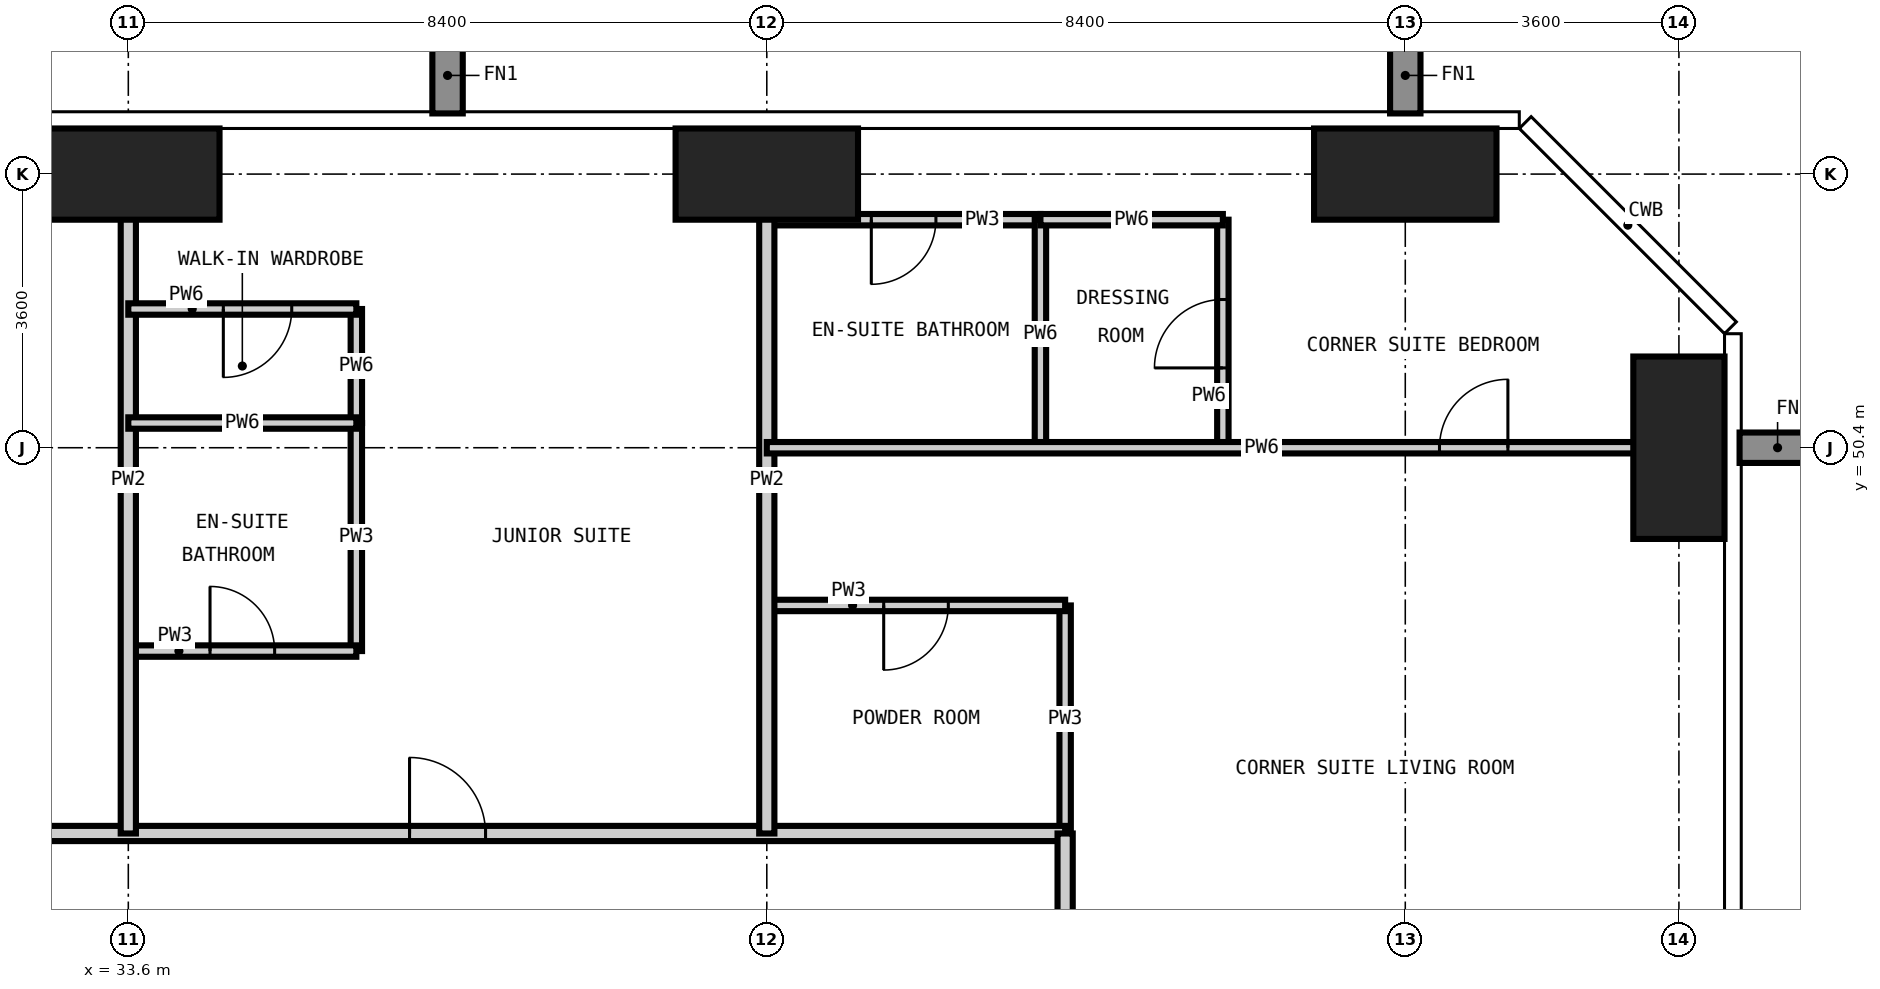
"""IFC4 building model, lengths in metres.
Left out: names, types, materials, properties, quantities, classifications, styles, units other than length and angle.
Written with IfcOpenShell. Run it as: python <this file> out.ifc"""

import sys

from ifc_helpers import new_model, si_unit, direction, frame, frame_2d, origin, origin_2d, place, context, subcontext, project, spatial, rectangle, extrude, element, fill, save


model = new_model("IFC4")
c1 = context("Model", 3, precision=1e-05, world=origin(), true_north=direction((0.0, 1.0)))
c2 = subcontext(c1, "Body", "Model", "MODEL_VIEW")
j1 = project(units=[si_unit("LENGTHUNIT", "METRE"), si_unit("PLANEANGLEUNIT", "RADIAN")], contexts=[c1])
p1 = place(None, origin())
s1 = spatial("IfcSite", under=j1, at=p1, CompositionType="ELEMENT")
p2 = place(p1, origin())
s2 = spatial("IfcBuilding", under=s1, at=p2, CompositionType="ELEMENT")
p3 = place(p2, frame((0.0, 0.0, 100.8)))
s3 = spatial("IfcBuildingStorey", under=s2, at=p3, CompositionType="ELEMENT", Elevation=100.8)
for number, where, z_axis, x_axis in (
    (1, (33.6, 54.0, -0.35), (0.0, 0.0, 1.0), (1.0, 0.0, 0.0)),
    (2, (42.0, 54.0, -0.35), (0.0, 0.0, 1.0), (1.0, 0.0, 0.0)),
    (3, (50.4, 54.0, -0.35), (0.0, 0.0, 1.0), (1.0, 0.0, 0.0)),
):
    element("IfcColumn", number, at=place(p3, frame(where, z_axis=z_axis, x_axis=x_axis)), inside=s3, PredefinedType="COLUMN", context=c2, shape_type="SweptSolid", body=[
        extrude(rectangle(XDim=2.4, YDim=1.2, at=origin_2d()), origin(), (0.0, 0.0, 1.0), 3.6),
    ])
p4 = place(p3, frame((54.0, 50.4, -0.35), z_axis=(0.0, 0.0, 1.0), x_axis=(1.0, 0.0, 0.0)))
e4 = element("IfcColumn", 4, at=p4, inside=s3, PredefinedType="COLUMN", context=c2, shape_type="SweptSolid", body=[
    extrude(rectangle(XDim=1.2, YDim=2.4, at=origin_2d()), origin(), (0.0, 0.0, 1.0), 3.6),
])
for number, where, z_axis, x_axis in (
    (5, (36.6, 47.725, 0.0), (0.0, 0.0, 1.0), (0.0, 1.0, 0.0)),
    (6, (45.925, 45.325, 0.0), (0.0, 0.0, 1.0), (0.0, 1.0, 0.0)),
):
    element("IfcWall", number, at=place(p3, frame(where, z_axis=z_axis, x_axis=x_axis)), inside=s3, PredefinedType="PARTITIONING", context=c2, shape_type="SweptSolid", body=[
        extrude(rectangle(XDim=3.0, YDim=0.15, at=frame_2d((1.5, 0.0))), origin(), (0.0, 0.0, 1.0), 3.25),
    ])
p5 = place(p3, frame((33.6, 47.725, 0.0), z_axis=(0.0, 0.0, 1.0), x_axis=(1.0, 0.0, 0.0)))
e7 = element("IfcWall", 7, at=p5, inside=s3, PredefinedType="PARTITIONING", context=c2, shape_type="SweptSolid", body=[
    extrude(rectangle(XDim=3.0, YDim=0.15, at=frame_2d((1.5, 0.0))), origin(), (0.0, 0.0, 1.0), 3.25),
])
p6 = place(p5, frame((1.075, 0.0, 0.0)))
e8 = element("IfcOpeningElement", 8, at=p6, cuts=e7, PredefinedType="OPENING", context=c2, shape_type="SweptSolid", body=[
    extrude(rectangle(XDim=0.85, YDim=2.1, at=frame_2d((0.425, 1.05))), frame((0.0, 0.085, 0.0), z_axis=(0.0, -1.0, 0.0), x_axis=(1.0, 0.0, 0.0)), (0.0, 0.0, 1.0), 0.17),
])
p7 = place(p3, frame((42.0, 48.325, 0.0), z_axis=(0.0, 0.0, 1.0), x_axis=(1.0, 0.0, 0.0)))
e9 = element("IfcWall", 9, at=p7, inside=s3, PredefinedType="PARTITIONING", context=c2, shape_type="SweptSolid", body=[
    extrude(rectangle(XDim=3.925, YDim=0.15, at=frame_2d((1.962, 0.0))), origin(), (0.0, 0.0, 1.0), 3.25),
])
p8 = place(p7, frame((1.538, 0.0, 0.0)))
e10 = element("IfcOpeningElement", 10, at=p8, cuts=e9, PredefinedType="OPENING", context=c2, shape_type="SweptSolid", body=[
    extrude(rectangle(XDim=0.85, YDim=2.1, at=frame_2d((0.425, 1.05))), frame((0.0, 0.085, 0.0), z_axis=(0.0, -1.0, 0.0), x_axis=(1.0, 0.0, 0.0)), (0.0, 0.0, 1.0), 0.17),
])
p9 = place(p3, frame((42.0, 53.4, 0.0), z_axis=(0.0, 0.0, 1.0), x_axis=(1.0, 0.0, 0.0)))
e11 = element("IfcWall", 11, at=p9, inside=s3, PredefinedType="PARTITIONING", context=c2, shape_type="SweptSolid", body=[
    extrude(rectangle(XDim=3.6, YDim=0.15, at=frame_2d((1.8, 0.0))), origin(), (0.0, 0.0, 1.0), 3.25),
])
p10 = place(p9, frame((1.375, 0.0, 0.0)))
e12 = element("IfcOpeningElement", 12, at=p10, cuts=e11, PredefinedType="OPENING", context=c2, shape_type="SweptSolid", body=[
    extrude(rectangle(XDim=0.85, YDim=2.1, at=frame_2d((0.425, 1.05))), frame((0.0, 0.085, 0.0), z_axis=(0.0, -1.0, 0.0), x_axis=(1.0, 0.0, 0.0)), (0.0, 0.0, 1.0), 0.17),
])
p11 = place(p3, frame((12.6, 45.325, 0.0), z_axis=(0.0, 0.0, 1.0), x_axis=(1.0, 0.0, 0.0)))
e13 = element("IfcWall", 13, at=p11, inside=s3, PredefinedType="PARTITIONING", context=c2, shape_type="SweptSolid", body=[
    extrude(rectangle(XDim=33.325, YDim=0.2, at=frame_2d((16.663, 0.0))), origin(), (0.0, 0.0, 1.0), 3.25),
])
p12 = place(p11, frame((7.9, 0.0, 0.0)))
e14 = element("IfcOpeningElement", 14, at=p12, cuts=e13, PredefinedType="OPENING", context=c2, shape_type="SweptSolid", body=[
    extrude(rectangle(XDim=1.0, YDim=2.2, at=frame_2d((0.5, 1.1))), frame((0.0, 0.11, 0.0), z_axis=(0.0, -1.0, 0.0), x_axis=(1.0, 0.0, 0.0)), (0.0, 0.0, 1.0), 0.22),
])
p13 = place(p11, frame((16.3, 0.0, 0.0)))
e15 = element("IfcOpeningElement", 15, at=p13, cuts=e13, PredefinedType="OPENING", context=c2, shape_type="SweptSolid", body=[
    extrude(rectangle(XDim=1.0, YDim=2.2, at=frame_2d((0.5, 1.1))), frame((0.0, 0.11, 0.0), z_axis=(0.0, -1.0, 0.0), x_axis=(1.0, 0.0, 0.0)), (0.0, 0.0, 1.0), 0.22),
])
p14 = place(p11, frame((24.7, 0.0, 0.0)))
e16 = element("IfcOpeningElement", 16, at=p14, cuts=e13, PredefinedType="OPENING", context=c2, shape_type="SweptSolid", body=[
    extrude(rectangle(XDim=1.0, YDim=2.2, at=frame_2d((0.5, 1.1))), frame((0.0, 0.11, 0.0), z_axis=(0.0, -1.0, 0.0), x_axis=(1.0, 0.0, 0.0)), (0.0, 0.0, 1.0), 0.22),
])
p15 = place(p3, frame((45.925, 45.325, 0.0), z_axis=(0.0, 0.0, 1.0), x_axis=(0.0, -1.0, 0.0)))
e17 = element("IfcWall", 17, at=p15, inside=s3, PredefinedType="PARTITIONING", context=c2, shape_type="SweptSolid", body=[
    extrude(rectangle(XDim=31.25, YDim=0.2, at=frame_2d((15.625, 0.0))), origin(), (0.0, 0.0, 1.0), 3.25),
])
p16 = place(p15, frame((25.925, 0.0, 0.0)))
e18 = element("IfcOpeningElement", 18, at=p16, cuts=e17, PredefinedType="OPENING", context=c2, shape_type="SweptSolid", body=[
    extrude(rectangle(XDim=1.0, YDim=2.2, at=frame_2d((0.5, 1.1))), frame((0.0, 0.11, 0.0), z_axis=(0.0, -1.0, 0.0), x_axis=(1.0, 0.0, 0.0)), (0.0, 0.0, 1.0), 0.22),
])
p17 = place(p15, frame((19.625, 0.0, 0.0)))
e19 = element("IfcOpeningElement", 19, at=p17, cuts=e17, PredefinedType="OPENING", context=c2, shape_type="SweptSolid", body=[
    extrude(rectangle(XDim=1.0, YDim=2.2, at=frame_2d((0.5, 1.1))), frame((0.0, 0.11, 0.0), z_axis=(0.0, -1.0, 0.0), x_axis=(1.0, 0.0, 0.0)), (0.0, 0.0, 1.0), 0.22),
])
p18 = place(p15, frame((11.225, 0.0, 0.0)))
e20 = element("IfcOpeningElement", 20, at=p18, cuts=e17, PredefinedType="OPENING", context=c2, shape_type="SweptSolid", body=[
    extrude(rectangle(XDim=1.0, YDim=2.2, at=frame_2d((0.5, 1.1))), frame((0.0, 0.11, 0.0), z_axis=(0.0, -1.0, 0.0), x_axis=(1.0, 0.0, 0.0)), (0.0, 0.0, 1.0), 0.22),
])
p19 = place(p15, frame((4.925, 0.0, 0.0)))
e21 = element("IfcOpeningElement", 21, at=p19, cuts=e17, PredefinedType="OPENING", context=c2, shape_type="SweptSolid", body=[
    extrude(rectangle(XDim=1.0, YDim=2.2, at=frame_2d((0.5, 1.1))), frame((0.0, 0.11, 0.0), z_axis=(0.0, -1.0, 0.0), x_axis=(1.0, 0.0, 0.0)), (0.0, 0.0, 1.0), 0.22),
])
p20 = place(p15, frame((29.387, 0.0, 0.0)))
e22 = element("IfcOpeningElement", 22, at=p20, cuts=e17, PredefinedType="OPENING", context=c2, shape_type="SweptSolid", body=[
    extrude(rectangle(XDim=1.0, YDim=2.2, at=frame_2d((0.5, 1.1))), frame((0.0, 0.11, 0.0), z_axis=(0.0, -1.0, 0.0), x_axis=(1.0, 0.0, 0.0)), (0.0, 0.0, 1.0), 0.22),
])
p21 = place(p15, frame((1.162, 0.0, 0.0)))
e23 = element("IfcOpeningElement", 23, at=p21, cuts=e17, PredefinedType="OPENING", context=c2, shape_type="SweptSolid", body=[
    extrude(rectangle(XDim=1.0, YDim=2.2, at=frame_2d((0.5, 1.1))), frame((0.0, 0.11, 0.0), z_axis=(0.0, -1.0, 0.0), x_axis=(1.0, 0.0, 0.0)), (0.0, 0.0, 1.0), 0.22),
])
for number, where, z_axis, x_axis in (
    (24, (33.6, 45.325, 0.0), (0.0, 0.0, 1.0), (0.0, 1.0, 0.0)),
    (25, (42.0, 45.325, 0.0), (0.0, 0.0, 1.0), (0.0, 1.0, 0.0)),
):
    element("IfcWall", number, at=place(p3, frame(where, z_axis=z_axis, x_axis=x_axis)), inside=s3, PredefinedType="PARTITIONING", context=c2, shape_type="SweptSolid", body=[
        extrude(rectangle(XDim=9.293, YDim=0.2, at=frame_2d((4.646, 0.0))), origin(), (0.0, 0.0, 1.0), 3.25),
    ])
p22 = place(p3, frame((36.6, 50.725, 0.0), z_axis=(0.0, 0.0, 1.0), x_axis=(0.0, 1.0, 0.0)))
e26 = element("IfcWall", 26, at=p22, inside=s3, PredefinedType="PARTITIONING", context=c2, shape_type="SweptSolid", body=[
    extrude(rectangle(XDim=1.5, YDim=0.15, at=frame_2d((0.75, 0.0))), origin(), (0.0, 0.0, 1.0), 3.25),
])
p23 = place(p3, frame((45.6, 50.4, 0.0), z_axis=(0.0, 0.0, 1.0), x_axis=(0.0, 1.0, 0.0)))
e27 = element("IfcWall", 27, at=p23, inside=s3, PredefinedType="PARTITIONING", context=c2, shape_type="SweptSolid", body=[
    extrude(rectangle(XDim=3.0, YDim=0.15, at=frame_2d((1.5, 0.0))), origin(), (0.0, 0.0, 1.0), 3.25),
])
p24 = place(p3, frame((48.0, 50.4, 0.0), z_axis=(0.0, 0.0, 1.0), x_axis=(0.0, 1.0, 0.0)))
e28 = element("IfcWall", 28, at=p24, inside=s3, PredefinedType="PARTITIONING", context=c2, shape_type="SweptSolid", body=[
    extrude(rectangle(XDim=3.0, YDim=0.15, at=frame_2d((1.5, 0.0))), origin(), (0.0, 0.0, 1.0), 3.25),
])
p25 = place(p24, frame((1.05, 0.0, 0.0)))
e29 = element("IfcOpeningElement", 29, at=p25, cuts=e28, PredefinedType="OPENING", context=c2, shape_type="SweptSolid", body=[
    extrude(rectangle(XDim=0.9, YDim=2.1, at=frame_2d((0.45, 1.05))), frame((0.0, 0.085, 0.0), z_axis=(0.0, -1.0, 0.0), x_axis=(1.0, 0.0, 0.0)), (0.0, 0.0, 1.0), 0.17),
])
p26 = place(p3, frame((42.0, 50.4, 0.0), z_axis=(0.0, 0.0, 1.0), x_axis=(1.0, 0.0, 0.0)))
e30 = element("IfcWall", 30, at=p26, inside=s3, PredefinedType="PARTITIONING", context=c2, shape_type="SweptSolid", body=[
    extrude(rectangle(XDim=12.618, YDim=0.15, at=frame_2d((6.309, 0.0))), origin(), (0.0, 0.0, 1.0), 3.25),
])
p27 = place(p26, frame((8.85, 0.0, 0.0)))
e31 = element("IfcOpeningElement", 31, at=p27, cuts=e30, PredefinedType="OPENING", context=c2, shape_type="SweptSolid", body=[
    extrude(rectangle(XDim=0.9, YDim=2.1, at=frame_2d((0.45, 1.05))), frame((0.0, 0.085, 0.0), z_axis=(0.0, -1.0, 0.0), x_axis=(1.0, 0.0, 0.0)), (0.0, 0.0, 1.0), 0.17),
])
p28 = place(p3, frame((33.6, 50.725, 0.0), z_axis=(0.0, 0.0, 1.0), x_axis=(1.0, 0.0, 0.0)))
e32 = element("IfcWall", 32, at=p28, inside=s3, PredefinedType="PARTITIONING", context=c2, shape_type="SweptSolid", body=[
    extrude(rectangle(XDim=3.0, YDim=0.15, at=frame_2d((1.5, 0.0))), origin(), (0.0, 0.0, 1.0), 3.25),
])
p29 = place(p3, frame((33.6, 52.225, 0.0), z_axis=(0.0, 0.0, 1.0), x_axis=(1.0, 0.0, 0.0)))
e33 = element("IfcWall", 33, at=p29, inside=s3, PredefinedType="PARTITIONING", context=c2, shape_type="SweptSolid", body=[
    extrude(rectangle(XDim=3.0, YDim=0.15, at=frame_2d((1.5, 0.0))), origin(), (0.0, 0.0, 1.0), 3.25),
])
p30 = place(p29, frame((1.25, 0.0, 0.0)))
e34 = element("IfcOpeningElement", 34, at=p30, cuts=e33, PredefinedType="OPENING", context=c2, shape_type="SweptSolid", body=[
    extrude(rectangle(XDim=0.9, YDim=2.1, at=frame_2d((0.45, 1.05))), frame((0.0, 0.085, 0.0), z_axis=(0.0, -1.0, 0.0), x_axis=(1.0, 0.0, 0.0)), (0.0, 0.0, 1.0), 0.17),
])
p31 = place(p3, frame((45.6, 53.4, 0.0), z_axis=(0.0, 0.0, 1.0), x_axis=(1.0, 0.0, 0.0)))
e35 = element("IfcWall", 35, at=p31, inside=s3, PredefinedType="PARTITIONING", context=c2, shape_type="SweptSolid", body=[
    extrude(rectangle(XDim=2.4, YDim=0.15, at=frame_2d((1.2, 0.0))), origin(), (0.0, 0.0, 1.0), 3.25),
])
p32 = place(p14, origin())
e36 = element("IfcDoor", 36, at=p32, inside=s3, OperationType="SINGLE_SWING_LEFT", PredefinedType="DOOR", context=c2, shape_type="SweptSolid", body=[
    extrude(rectangle(XDim=1.0, YDim=2.2, at=frame_2d((0.5, 1.1))), frame((0.0, 0.025, 0.0), z_axis=(0.0, -1.0, 0.0), x_axis=(1.0, 0.0, 0.0)), (0.0, 0.0, 1.0), 0.05),
])
fill(e16, e36)
p33 = place(p6, origin())
e37 = element("IfcDoor", 37, at=p33, inside=s3, OperationType="SINGLE_SWING_LEFT", PredefinedType="DOOR", context=c2, shape_type="SweptSolid", body=[
    extrude(rectangle(XDim=0.85, YDim=2.1, at=frame_2d((0.425, 1.05))), frame((0.0, 0.025, 0.0), z_axis=(0.0, -1.0, 0.0), x_axis=(1.0, 0.0, 0.0)), (0.0, 0.0, 1.0), 0.05),
])
fill(e8, e37)
p34 = place(p30, frame((0.9, 0.0, 0.0), z_axis=(0.0, 0.0, 1.0), x_axis=(-1.0, 0.0, 0.0)))
e38 = element("IfcDoor", 38, at=p34, inside=s3, OperationType="SINGLE_SWING_RIGHT", PredefinedType="DOOR", context=c2, shape_type="SweptSolid", body=[
    extrude(rectangle(XDim=0.9, YDim=2.1, at=frame_2d((0.45, 1.05))), frame((0.0, 0.025, 0.0), z_axis=(0.0, -1.0, 0.0), x_axis=(1.0, 0.0, 0.0)), (0.0, 0.0, 1.0), 0.05),
])
fill(e34, e38)
p35 = place(p8, frame((0.85, 0.0, 0.0), z_axis=(0.0, 0.0, 1.0), x_axis=(-1.0, 0.0, 0.0)))
e39 = element("IfcDoor", 39, at=p35, inside=s3, OperationType="SINGLE_SWING_RIGHT", PredefinedType="DOOR", context=c2, shape_type="SweptSolid", body=[
    extrude(rectangle(XDim=0.85, YDim=2.1, at=frame_2d((0.425, 1.05))), frame((0.0, 0.025, 0.0), z_axis=(0.0, -1.0, 0.0), x_axis=(1.0, 0.0, 0.0)), (0.0, 0.0, 1.0), 0.05),
])
fill(e10, e39)
p36 = place(p27, origin())
e40 = element("IfcDoor", 40, at=p36, inside=s3, OperationType="SINGLE_SWING_RIGHT", PredefinedType="DOOR", context=c2, shape_type="SweptSolid", body=[
    extrude(rectangle(XDim=0.9, YDim=2.1, at=frame_2d((0.45, 1.05))), frame((0.0, 0.025, 0.0), z_axis=(0.0, -1.0, 0.0), x_axis=(1.0, 0.0, 0.0)), (0.0, 0.0, 1.0), 0.05),
])
fill(e31, e40)
p37 = place(p10, frame((0.85, 0.0, 0.0), z_axis=(0.0, 0.0, 1.0), x_axis=(-1.0, 0.0, 0.0)))
e41 = element("IfcDoor", 41, at=p37, inside=s3, OperationType="SINGLE_SWING_RIGHT", PredefinedType="DOOR", context=c2, shape_type="SweptSolid", body=[
    extrude(rectangle(XDim=0.85, YDim=2.1, at=frame_2d((0.425, 1.05))), frame((0.0, 0.025, 0.0), z_axis=(0.0, -1.0, 0.0), x_axis=(1.0, 0.0, 0.0)), (0.0, 0.0, 1.0), 0.05),
])
fill(e12, e41)
p38 = place(p25, origin())
e42 = element("IfcDoor", 42, at=p38, inside=s3, OperationType="SINGLE_SWING_LEFT", PredefinedType="DOOR", context=c2, shape_type="SweptSolid", body=[
    extrude(rectangle(XDim=0.9, YDim=2.1, at=frame_2d((0.45, 1.05))), frame((0.0, 0.025, 0.0), z_axis=(0.0, -1.0, 0.0), x_axis=(1.0, 0.0, 0.0)), (0.0, 0.0, 1.0), 0.05),
])
fill(e29, e42)
save(model, sys.argv[1])
